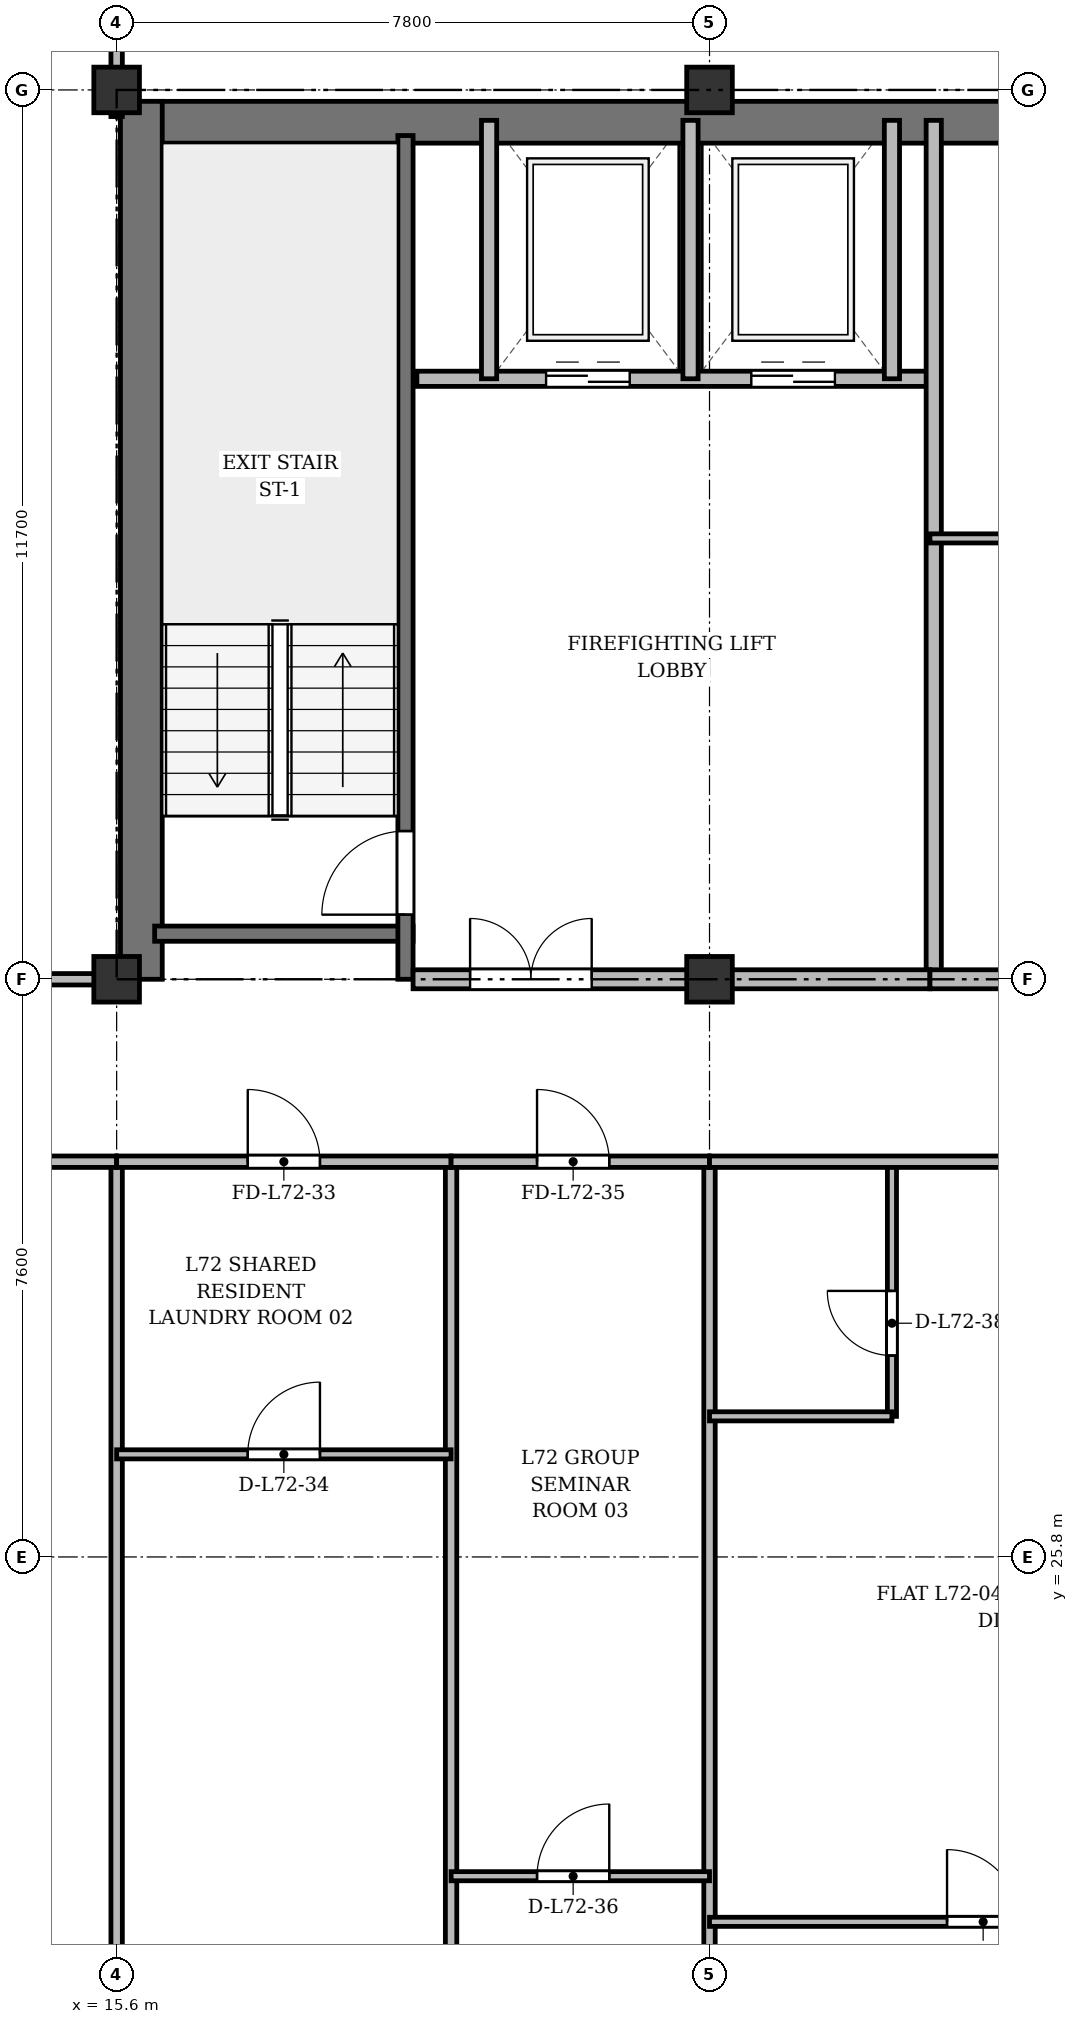
"""IFC4 building model, lengths in metres.
Left out: names, types, materials, properties, quantities, classifications, styles, units other than length and angle.
Written with IfcOpenShell. Run it as: python <this file> out.ifc"""

import sys

from ifc_helpers import new_model, si_unit, direction, frame, frame_2d, origin, origin_2d, place, context, subcontext, project, spatial, rectangle, extrude, source, transform, mapped, element, fill, save


model = new_model("IFC4")
c1 = context("Model", 3, precision=1e-05, world=origin(), true_north=direction((0.0, 1.0)))
c2 = subcontext(c1, "Body", "Model", "MODEL_VIEW")
j1 = project(units=[si_unit("LENGTHUNIT", "METRE"), si_unit("PLANEANGLEUNIT", "RADIAN")], contexts=[c1])
p1 = place(None, origin())
s1 = spatial("IfcSite", under=j1, at=p1, CompositionType="ELEMENT")
p2 = place(p1, origin())
s2 = spatial("IfcBuilding", under=s1, at=p2, CompositionType="ELEMENT")
p3 = place(p2, frame((0.0, 0.0, 277.5)))
s3 = spatial("IfcBuildingStorey", under=s2, at=p3, CompositionType="ELEMENT", Elevation=277.5)
m1 = source(origin(), c2, "Body", "SweptSolid", [
    extrude(rectangle(XDim=0.6, YDim=0.6, at=origin_2d()), origin(), (0.0, 0.0, 1.0), 3.6),
])
for number, where, z_axis, x_axis in (
    (1, (15.6, 33.4, 0.0), (0.0, 0.0, 1.0), (1.0, 0.0, 0.0)),
    (2, (15.6, 45.1, 0.0), (0.0, 0.0, 1.0), (1.0, 0.0, 0.0)),
    (3, (23.4, 33.4, 0.0), (0.0, 0.0, 1.0), (1.0, 0.0, 0.0)),
    (4, (23.4, 45.1, 0.0), (0.0, 0.0, 1.0), (1.0, 0.0, 0.0)),
):
    element("IfcColumn", number, at=place(p3, frame(where, z_axis=z_axis, x_axis=x_axis)), inside=s3, PredefinedType="COLUMN", context=c2, shape_type="MappedRepresentation", body=[
        mapped(m1, transform((0.0, 0.0, 0.0), x_axis=(1.0, 0.0, 0.0), y_axis=(0.0, 1.0, 0.0), z_axis=(0.0, 0.0, 1.0), scale=1.0)),
    ])
p4 = place(p3, frame((15.65, 44.675, 0.0), z_axis=(0.0, 0.0, 1.0), x_axis=(1.0, 0.0, 0.0)))
e5 = element("IfcWall", 5, at=p4, inside=s3, PredefinedType="SHEAR", context=c2, shape_type="SweptSolid", body=[
    extrude(rectangle(XDim=43.1, YDim=0.55, at=frame_2d((21.55, 0.0))), origin(), (0.0, 0.0, 1.0), 3.37),
])
p5 = place(p3, frame((15.925, 33.4, 0.0), z_axis=(0.0, 0.0, 1.0), x_axis=(0.0, 1.0, 0.0)))
e6 = element("IfcWall", 6, at=p5, inside=s3, PredefinedType="SHEAR", context=c2, shape_type="SweptSolid", body=[
    extrude(rectangle(XDim=11.55, YDim=0.55, at=frame_2d((5.775, 0.0))), origin(), (0.0, 0.0, 1.0), 3.37),
])
p6 = place(p3, frame((16.1, 34.0, 0.0), z_axis=(0.0, 0.0, 1.0), x_axis=(1.0, 0.0, 0.0)))
e7 = element("IfcWall", 7, at=p6, inside=s3, PredefinedType="SHEAR", context=c2, shape_type="SweptSolid", body=[
    extrude(rectangle(XDim=3.4, YDim=0.2, at=frame_2d((1.7, 0.0))), origin(), (0.0, 0.0, 1.0), 3.37),
])
p7 = place(p3, frame((19.4, 33.4, 0.0), z_axis=(0.0, 0.0, 1.0), x_axis=(0.0, 1.0, 0.0)))
e8 = element("IfcWall", 8, at=p7, inside=s3, PredefinedType="SHEAR", context=c2, shape_type="SweptSolid", body=[
    extrude(rectangle(XDim=11.1, YDim=0.2, at=frame_2d((5.55, 0.0))), origin(), (0.0, 0.0, 1.0), 3.37),
])
p8 = place(p7, frame((0.85, 0.0, 0.0)))
e9 = element("IfcOpeningElement", 9, at=p8, cuts=e8, PredefinedType="OPENING", context=c2, shape_type="SweptSolid", body=[
    extrude(rectangle(XDim=1.1, YDim=2.15, at=frame_2d((0.55, 1.075))), frame((0.0, 0.11, 0.0), z_axis=(0.0, -1.0, 0.0), x_axis=(1.0, 0.0, 0.0)), (0.0, 0.0, 1.0), 0.22),
])
p9 = place(p3, frame((19.55, 41.3, 0.0), z_axis=(0.0, 0.0, 1.0), x_axis=(1.0, 0.0, 0.0)))
e10 = element("IfcWall", 10, at=p9, inside=s3, PredefinedType="SOLIDWALL", context=c2, shape_type="SweptSolid", body=[
    extrude(rectangle(XDim=6.75, YDim=0.2, at=frame_2d((3.375, 0.0))), origin(), (0.0, 0.0, 1.0), 3.37),
])
p10 = place(p9, frame((1.7, 0.0, 0.0)))
e11 = element("IfcOpeningElement", 11, at=p10, cuts=e10, PredefinedType="OPENING", context=c2, shape_type="SweptSolid", body=[
    extrude(rectangle(XDim=1.1, YDim=2.15, at=frame_2d((0.55, 1.075))), frame((0.0, 0.11, 0.0), z_axis=(0.0, -1.0, 0.0), x_axis=(1.0, 0.0, 0.0)), (0.0, 0.0, 1.0), 0.22),
])
p11 = place(p9, frame((4.4, 0.0, 0.0)))
e12 = element("IfcOpeningElement", 12, at=p11, cuts=e10, PredefinedType="OPENING", context=c2, shape_type="SweptSolid", body=[
    extrude(rectangle(XDim=1.1, YDim=2.15, at=frame_2d((0.55, 1.075))), frame((0.0, 0.11, 0.0), z_axis=(0.0, -1.0, 0.0), x_axis=(1.0, 0.0, 0.0)), (0.0, 0.0, 1.0), 0.22),
])
for number, where, z_axis, x_axis in (
    (13, (20.5, 41.3, 0.0), (0.0, 0.0, 1.0), (0.0, 1.0, 0.0)),
    (14, (23.15, 41.3, 0.0), (0.0, 0.0, 1.0), (0.0, 1.0, 0.0)),
    (15, (25.8, 41.3, 0.0), (0.0, 0.0, 1.0), (0.0, 1.0, 0.0)),
):
    element("IfcWall", number, at=place(p3, frame(where, z_axis=z_axis, x_axis=x_axis)), inside=s3, PredefinedType="SOLIDWALL", context=c2, shape_type="SweptSolid", body=[
        extrude(rectangle(XDim=3.4, YDim=0.2, at=frame_2d((1.7, 0.0))), origin(), (0.0, 0.0, 1.0), 3.37),
    ])
p12 = place(p3, frame((26.35, 33.4, 0.0), z_axis=(0.0, 0.0, 1.0), x_axis=(0.0, 1.0, 0.0)))
e16 = element("IfcWall", 16, at=p12, inside=s3, PredefinedType="SOLIDWALL", context=c2, shape_type="SweptSolid", body=[
    extrude(rectangle(XDim=11.3, YDim=0.2, at=frame_2d((5.65, 0.0))), origin(), (0.0, 0.0, 1.0), 2.92),
])
p13 = place(p3, frame((19.5, 33.4, 0.0), z_axis=(0.0, 0.0, 1.0), x_axis=(1.0, 0.0, 0.0)))
e17 = element("IfcWall", 17, at=p13, inside=s3, PredefinedType="PARTITIONING", context=c2, shape_type="SweptSolid", body=[
    extrude(rectangle(XDim=6.8, YDim=0.25, at=frame_2d((3.4, 0.0))), origin(), (0.0, 0.0, 1.0), 2.92),
])
p14 = place(p13, frame((0.75, 0.0, 0.0)))
e18 = element("IfcOpeningElement", 18, at=p14, cuts=e17, PredefinedType="OPENING", context=c2, shape_type="SweptSolid", body=[
    extrude(rectangle(XDim=1.6, YDim=2.2, at=frame_2d((0.8, 1.1))), frame((0.0, 0.135, 0.0), z_axis=(0.0, -1.0, 0.0), x_axis=(1.0, 0.0, 0.0)), (0.0, 0.0, 1.0), 0.27),
])
p15 = place(p3, frame((26.3, 39.2, 0.0), z_axis=(0.0, 0.0, 1.0), x_axis=(1.0, 0.0, 0.0)))
e19 = element("IfcWall", 19, at=p15, inside=s3, PredefinedType="PARTITIONING", context=c2, shape_type="SweptSolid", body=[
    extrude(rectangle(XDim=7.0, YDim=0.12, at=frame_2d((3.5, 0.0))), origin(), (0.0, 0.0, 1.0), 2.87),
])
p16 = place(p15, frame((2.6, 0.0, 0.0)))
e20 = element("IfcOpeningElement", 20, at=p16, cuts=e19, PredefinedType="OPENING", context=c2, shape_type="SweptSolid", body=[
    extrude(rectangle(XDim=0.95, YDim=2.15, at=frame_2d((0.475, 1.075))), frame((0.0, 0.07, 0.0), z_axis=(0.0, -1.0, 0.0), x_axis=(1.0, 0.0, 0.0)), (0.0, 0.0, 1.0), 0.14),
])
p17 = place(p3, frame((26.3, 33.4, 0.0), z_axis=(0.0, 0.0, 1.0), x_axis=(1.0, 0.0, 0.0)))
e21 = element("IfcWall", 21, at=p17, inside=s3, PredefinedType="PARTITIONING", context=c2, shape_type="SweptSolid", body=[
    extrude(rectangle(XDim=7.0, YDim=0.25, at=frame_2d((3.5, 0.0))), origin(), (0.0, 0.0, 1.0), 2.92),
])
p18 = place(p17, frame((1.35, 0.0, 0.0)))
e22 = element("IfcOpeningElement", 22, at=p18, cuts=e21, PredefinedType="OPENING", context=c2, shape_type="SweptSolid", body=[
    extrude(rectangle(XDim=0.95, YDim=2.15, at=frame_2d((0.475, 1.075))), frame((0.0, 0.135, 0.0), z_axis=(0.0, -1.0, 0.0), x_axis=(1.0, 0.0, 0.0)), (0.0, 0.0, 1.0), 0.27),
])
p19 = place(p3, frame((8.45, 33.4, 0.0), z_axis=(0.0, 0.0, 1.0), x_axis=(1.0, 0.0, 0.0)))
e23 = element("IfcWall", 23, at=p19, inside=s3, PredefinedType="PARTITIONING", context=c2, shape_type="SweptSolid", body=[
    extrude(rectangle(XDim=7.15, YDim=0.15, at=frame_2d((3.575, 0.0))), origin(), (0.0, 0.0, 1.0), 2.92),
])
p20 = place(p19, frame((3.0, 0.0, 0.0)))
e24 = element("IfcOpeningElement", 24, at=p20, cuts=e23, PredefinedType="OPENING", context=c2, shape_type="SweptSolid", body=[
    extrude(rectangle(XDim=0.95, YDim=2.15, at=frame_2d((0.475, 1.075))), frame((0.0, 0.085, 0.0), z_axis=(0.0, -1.0, 0.0), x_axis=(1.0, 0.0, 0.0)), (0.0, 0.0, 1.0), 0.17),
])
p21 = place(p3, frame((15.6, 44.75, 0.0), z_axis=(0.0, 0.0, 1.0), x_axis=(0.0, 1.0, 0.0)))
e25 = element("IfcWall", 25, at=p21, inside=s3, PredefinedType="PARTITIONING", context=c2, shape_type="SweptSolid", body=[
    extrude(rectangle(XDim=3.61, YDim=0.15, at=frame_2d((1.805, 0.0))), origin(), (0.0, 0.0, 1.0), 2.87),
])
p22 = place(p21, frame((1.1, 0.0, 0.0)))
e26 = element("IfcOpeningElement", 26, at=p22, cuts=e25, PredefinedType="OPENING", context=c2, shape_type="SweptSolid", body=[
    extrude(rectangle(XDim=0.95, YDim=2.15, at=frame_2d((0.475, 1.075))), frame((0.0, 0.085, 0.0), z_axis=(0.0, -1.0, 0.0), x_axis=(1.0, 0.0, 0.0)), (0.0, 0.0, 1.0), 0.17),
])
p23 = place(p3, frame((15.6, 3.725, 0.0), z_axis=(0.0, 0.0, 1.0), x_axis=(0.0, 1.0, 0.0)))
e27 = element("IfcWall", 27, at=p23, inside=s3, PredefinedType="PARTITIONING", context=c2, shape_type="SweptSolid", body=[
    extrude(rectangle(XDim=27.275, YDim=0.15, at=frame_2d((13.637, 0.0))), origin(), (0.0, 0.0, 1.0), 2.87),
])
p24 = place(p3, frame((20.0, 3.725, 0.0), z_axis=(0.0, 0.0, 1.0), x_axis=(0.0, 1.0, 0.0)))
e28 = element("IfcWall", 28, at=p24, inside=s3, PredefinedType="PARTITIONING", context=c2, shape_type="SweptSolid", body=[
    extrude(rectangle(XDim=27.275, YDim=0.15, at=frame_2d((13.637, 0.0))), origin(), (0.0, 0.0, 1.0), 2.92),
])
p25 = place(p3, frame((23.4, 3.725, 0.0), z_axis=(0.0, 0.0, 1.0), x_axis=(0.0, 1.0, 0.0)))
e29 = element("IfcWall", 29, at=p25, inside=s3, PredefinedType="PARTITIONING", context=c2, shape_type="SweptSolid", body=[
    extrude(rectangle(XDim=27.275, YDim=0.15, at=frame_2d((13.637, 0.0))), origin(), (0.0, 0.0, 1.0), 2.87),
])
p26 = place(p3, frame((8.425, 31.0, 0.0), z_axis=(0.0, 0.0, 1.0), x_axis=(1.0, 0.0, 0.0)))
e30 = element("IfcWall", 30, at=p26, inside=s3, PredefinedType="PARTITIONING", context=c2, shape_type="SweptSolid", body=[
    extrude(rectangle(XDim=7.175, YDim=0.15, at=frame_2d((3.587, 0.0))), origin(), (0.0, 0.0, 1.0), 2.87),
])
p27 = place(p26, frame((4.681, 0.0, 0.0)))
e31 = element("IfcOpeningElement", 31, at=p27, cuts=e30, PredefinedType="OPENING", context=c2, shape_type="SweptSolid", body=[
    extrude(rectangle(XDim=0.95, YDim=2.15, at=frame_2d((0.475, 1.075))), frame((0.0, 0.085, 0.0), z_axis=(0.0, -1.0, 0.0), x_axis=(1.0, 0.0, 0.0)), (0.0, 0.0, 1.0), 0.17),
])
p28 = place(p3, frame((15.6, 31.0, 0.0), z_axis=(0.0, 0.0, 1.0), x_axis=(1.0, 0.0, 0.0)))
e32 = element("IfcWall", 32, at=p28, inside=s3, PredefinedType="PARTITIONING", context=c2, shape_type="SweptSolid", body=[
    extrude(rectangle(XDim=4.4, YDim=0.15, at=frame_2d((2.2, 0.0))), origin(), (0.0, 0.0, 1.0), 2.87),
])
p29 = place(p28, frame((1.725, 0.0, 0.0)))
e33 = element("IfcOpeningElement", 33, at=p29, cuts=e32, PredefinedType="OPENING", context=c2, shape_type="SweptSolid", body=[
    extrude(rectangle(XDim=0.95, YDim=2.15, at=frame_2d((0.475, 1.075))), frame((0.0, 0.085, 0.0), z_axis=(0.0, -1.0, 0.0), x_axis=(1.0, 0.0, 0.0)), (0.0, 0.0, 1.0), 0.17),
])
p30 = place(p3, frame((15.6, 27.15, 0.0), z_axis=(0.0, 0.0, 1.0), x_axis=(1.0, 0.0, 0.0)))
e34 = element("IfcWall", 34, at=p30, inside=s3, PredefinedType="PARTITIONING", context=c2, shape_type="SweptSolid", body=[
    extrude(rectangle(XDim=4.4, YDim=0.12, at=frame_2d((2.2, 0.0))), origin(), (0.0, 0.0, 1.0), 2.87),
])
p31 = place(p30, frame((1.725, 0.0, 0.0)))
e35 = element("IfcOpeningElement", 35, at=p31, cuts=e34, PredefinedType="OPENING", context=c2, shape_type="SweptSolid", body=[
    extrude(rectangle(XDim=0.95, YDim=2.15, at=frame_2d((0.475, 1.075))), frame((0.0, 0.07, 0.0), z_axis=(0.0, -1.0, 0.0), x_axis=(1.0, 0.0, 0.0)), (0.0, 0.0, 1.0), 0.14),
])
p32 = place(p3, frame((20.0, 31.0, 0.0), z_axis=(0.0, 0.0, 1.0), x_axis=(1.0, 0.0, 0.0)))
e36 = element("IfcWall", 36, at=p32, inside=s3, PredefinedType="PARTITIONING", context=c2, shape_type="SweptSolid", body=[
    extrude(rectangle(XDim=3.4, YDim=0.15, at=frame_2d((1.7, 0.0))), origin(), (0.0, 0.0, 1.0), 2.87),
])
p33 = place(p32, frame((1.131, 0.0, 0.0)))
e37 = element("IfcOpeningElement", 37, at=p33, cuts=e36, PredefinedType="OPENING", context=c2, shape_type="SweptSolid", body=[
    extrude(rectangle(XDim=0.95, YDim=2.15, at=frame_2d((0.475, 1.075))), frame((0.0, 0.085, 0.0), z_axis=(0.0, -1.0, 0.0), x_axis=(1.0, 0.0, 0.0)), (0.0, 0.0, 1.0), 0.17),
])
p34 = place(p3, frame((20.0, 21.6, 0.0), z_axis=(0.0, 0.0, 1.0), x_axis=(1.0, 0.0, 0.0)))
e38 = element("IfcWall", 38, at=p34, inside=s3, PredefinedType="PARTITIONING", context=c2, shape_type="SweptSolid", body=[
    extrude(rectangle(XDim=3.4, YDim=0.12, at=frame_2d((1.7, 0.0))), origin(), (0.0, 0.0, 1.0), 2.87),
])
p35 = place(p34, frame((1.131, 0.0, 0.0)))
e39 = element("IfcOpeningElement", 39, at=p35, cuts=e38, PredefinedType="OPENING", context=c2, shape_type="SweptSolid", body=[
    extrude(rectangle(XDim=0.95, YDim=2.15, at=frame_2d((0.475, 1.075))), frame((0.0, 0.07, 0.0), z_axis=(0.0, -1.0, 0.0), x_axis=(1.0, 0.0, 0.0)), (0.0, 0.0, 1.0), 0.14),
])
p36 = place(p3, frame((23.4, 21.0, 0.0), z_axis=(0.0, 0.0, 1.0), x_axis=(1.0, 0.0, 0.0)))
e40 = element("IfcWall", 40, at=p36, inside=s3, PredefinedType="PARTITIONING", context=c2, shape_type="SweptSolid", body=[
    extrude(rectangle(XDim=7.2, YDim=0.12, at=frame_2d((3.6, 0.0))), origin(), (0.0, 0.0, 1.0), 2.87),
])
p37 = place(p36, frame((3.125, 0.0, 0.0)))
e41 = element("IfcOpeningElement", 41, at=p37, cuts=e40, PredefinedType="OPENING", context=c2, shape_type="SweptSolid", body=[
    extrude(rectangle(XDim=0.95, YDim=2.15, at=frame_2d((0.475, 1.075))), frame((0.0, 0.07, 0.0), z_axis=(0.0, -1.0, 0.0), x_axis=(1.0, 0.0, 0.0)), (0.0, 0.0, 1.0), 0.14),
])
p38 = place(p3, frame((25.8, 27.65, 0.0), z_axis=(0.0, 0.0, 1.0), x_axis=(0.0, 1.0, 0.0)))
e42 = element("IfcWall", 42, at=p38, inside=s3, PredefinedType="PARTITIONING", context=c2, shape_type="SweptSolid", body=[
    extrude(rectangle(XDim=3.35, YDim=0.12, at=frame_2d((1.675, 0.0))), origin(), (0.0, 0.0, 1.0), 3.37),
])
p39 = place(p38, frame((0.8, 0.0, 0.0)))
e43 = element("IfcOpeningElement", 43, at=p39, cuts=e42, PredefinedType="OPENING", context=c2, shape_type="SweptSolid", body=[
    extrude(rectangle(XDim=0.85, YDim=2.1, at=frame_2d((0.425, 1.05))), frame((0.0, 0.07, 0.0), z_axis=(0.0, -1.0, 0.0), x_axis=(1.0, 0.0, 0.0)), (0.0, 0.0, 1.0), 0.14),
])
p40 = place(p3, frame((23.4, 27.65, 0.0), z_axis=(0.0, 0.0, 1.0), x_axis=(1.0, 0.0, 0.0)))
e44 = element("IfcWall", 44, at=p40, inside=s3, PredefinedType="PARTITIONING", context=c2, shape_type="SweptSolid", body=[
    extrude(rectangle(XDim=2.4, YDim=0.12, at=frame_2d((1.2, 0.0))), origin(), (0.0, 0.0, 1.0), 2.87),
])
p41 = place(p3, frame((23.4, 31.0, 0.0), z_axis=(0.0, 0.0, 1.0), x_axis=(1.0, 0.0, 0.0)))
e45 = element("IfcWall", 45, at=p41, inside=s3, PredefinedType="PARTITIONING", context=c2, shape_type="SweptSolid", body=[
    extrude(rectangle(XDim=7.2, YDim=0.15, at=frame_2d((3.6, 0.0))), origin(), (0.0, 0.0, 1.0), 2.87),
])
p42 = place(p41, frame((4.706, 0.0, 0.0)))
e46 = element("IfcOpeningElement", 46, at=p42, cuts=e45, PredefinedType="OPENING", context=c2, shape_type="SweptSolid", body=[
    extrude(rectangle(XDim=0.95, YDim=2.15, at=frame_2d((0.475, 1.075))), frame((0.0, 0.085, 0.0), z_axis=(0.0, -1.0, 0.0), x_axis=(1.0, 0.0, 0.0)), (0.0, 0.0, 1.0), 0.17),
])
m2 = source(origin(), c2, "Body", "SweptSolid", [
    extrude(rectangle(XDim=1.1, YDim=2.15, at=frame_2d((0.55, 1.075))), frame((0.0, 0.025, 0.0), z_axis=(0.0, -1.0, 0.0), x_axis=(1.0, 0.0, 0.0)), (0.0, 0.0, 1.0), 0.05),
])
p43 = place(p8, origin())
e47 = element("IfcDoor", 47, at=p43, inside=s3, OperationType="SINGLE_SWING_LEFT", PredefinedType="DOOR", context=c2, shape_type="MappedRepresentation", body=[
    mapped(m2, transform((0.0, 0.0, 0.0), x_axis=(1.0, 0.0, 0.0), y_axis=(0.0, 1.0, 0.0), z_axis=(0.0, 0.0, 1.0), scale=1.0)),
])
fill(e9, e47)
p44 = place(p10, origin())
e48 = element("IfcDoor", 48, at=p44, inside=s3, OperationType="DOUBLE_DOOR_SLIDING", PredefinedType="DOOR", context=c2, shape_type="MappedRepresentation", body=[
    mapped(m2, transform((0.0, 0.0, 0.0), x_axis=(1.0, 0.0, 0.0), y_axis=(0.0, 1.0, 0.0), z_axis=(0.0, 0.0, 1.0), scale=1.0)),
])
fill(e11, e48)
p45 = place(p11, origin())
e49 = element("IfcDoor", 49, at=p45, inside=s3, OperationType="DOUBLE_DOOR_SLIDING", PredefinedType="DOOR", context=c2, shape_type="MappedRepresentation", body=[
    mapped(m2, transform((0.0, 0.0, 0.0), x_axis=(1.0, 0.0, 0.0), y_axis=(0.0, 1.0, 0.0), z_axis=(0.0, 0.0, 1.0), scale=1.0)),
])
fill(e12, e49)
m3 = source(origin(), c2, "Body", "SweptSolid", [
    extrude(rectangle(XDim=1.6, YDim=2.2, at=frame_2d((0.8, 1.1))), frame((0.0, 0.025, 0.0), z_axis=(0.0, -1.0, 0.0), x_axis=(1.0, 0.0, 0.0)), (0.0, 0.0, 1.0), 0.05),
])
p46 = place(p14, origin())
e50 = element("IfcDoor", 50, at=p46, inside=s3, OperationType="DOUBLE_DOOR_SINGLE_SWING", PredefinedType="DOOR", context=c2, shape_type="MappedRepresentation", body=[
    mapped(m3, transform((0.0, 0.0, 0.0), x_axis=(1.0, 0.0, 0.0), y_axis=(0.0, 1.0, 0.0), z_axis=(0.0, 0.0, 1.0), scale=1.0)),
])
fill(e18, e50)
m4 = source(origin(), c2, "Body", "SweptSolid", [
    extrude(rectangle(XDim=0.95, YDim=2.15, at=frame_2d((0.475, 1.075))), frame((0.0, 0.025, 0.0), z_axis=(0.0, -1.0, 0.0), x_axis=(1.0, 0.0, 0.0)), (0.0, 0.0, 1.0), 0.05),
])
p47 = place(p29, origin())
e51 = element("IfcDoor", 51, at=p47, inside=s3, OperationType="SINGLE_SWING_LEFT", PredefinedType="DOOR", context=c2, shape_type="MappedRepresentation", body=[
    mapped(m4, transform((0.0, 0.0, 0.0), x_axis=(1.0, 0.0, 0.0), y_axis=(0.0, 1.0, 0.0), z_axis=(0.0, 0.0, 1.0), scale=1.0)),
])
fill(e33, e51)
p48 = place(p31, origin())
e52 = element("IfcDoor", 52, at=p48, inside=s3, OperationType="SINGLE_SWING_RIGHT", PredefinedType="DOOR", context=c2, shape_type="MappedRepresentation", body=[
    mapped(m4, transform((0.0, 0.0, 0.0), x_axis=(1.0, 0.0, 0.0), y_axis=(0.0, 1.0, 0.0), z_axis=(0.0, 0.0, 1.0), scale=1.0)),
])
fill(e35, e52)
p49 = place(p33, origin())
e53 = element("IfcDoor", 53, at=p49, inside=s3, OperationType="SINGLE_SWING_LEFT", PredefinedType="DOOR", context=c2, shape_type="MappedRepresentation", body=[
    mapped(m4, transform((0.0, 0.0, 0.0), x_axis=(1.0, 0.0, 0.0), y_axis=(0.0, 1.0, 0.0), z_axis=(0.0, 0.0, 1.0), scale=1.0)),
])
fill(e37, e53)
p50 = place(p35, origin())
e54 = element("IfcDoor", 54, at=p50, inside=s3, OperationType="SINGLE_SWING_RIGHT", PredefinedType="DOOR", context=c2, shape_type="MappedRepresentation", body=[
    mapped(m4, transform((0.0, 0.0, 0.0), x_axis=(1.0, 0.0, 0.0), y_axis=(0.0, 1.0, 0.0), z_axis=(0.0, 0.0, 1.0), scale=1.0)),
])
fill(e39, e54)
p51 = place(p37, origin())
e55 = element("IfcDoor", 55, at=p51, inside=s3, OperationType="SINGLE_SWING_LEFT", PredefinedType="DOOR", context=c2, shape_type="MappedRepresentation", body=[
    mapped(m4, transform((0.0, 0.0, 0.0), x_axis=(1.0, 0.0, 0.0), y_axis=(0.0, 1.0, 0.0), z_axis=(0.0, 0.0, 1.0), scale=1.0)),
])
fill(e41, e55)
m5 = source(origin(), c2, "Body", "SweptSolid", [
    extrude(rectangle(XDim=0.85, YDim=2.1, at=frame_2d((0.425, 1.05))), frame((0.0, 0.025, 0.0), z_axis=(0.0, -1.0, 0.0), x_axis=(1.0, 0.0, 0.0)), (0.0, 0.0, 1.0), 0.05),
])
p52 = place(p39, origin())
e56 = element("IfcDoor", 56, at=p52, inside=s3, OperationType="SINGLE_SWING_RIGHT", PredefinedType="DOOR", context=c2, shape_type="MappedRepresentation", body=[
    mapped(m5, transform((0.0, 0.0, 0.0), x_axis=(1.0, 0.0, 0.0), y_axis=(0.0, 1.0, 0.0), z_axis=(0.0, 0.0, 1.0), scale=1.0)),
])
fill(e43, e56)
save(model, sys.argv[1])
